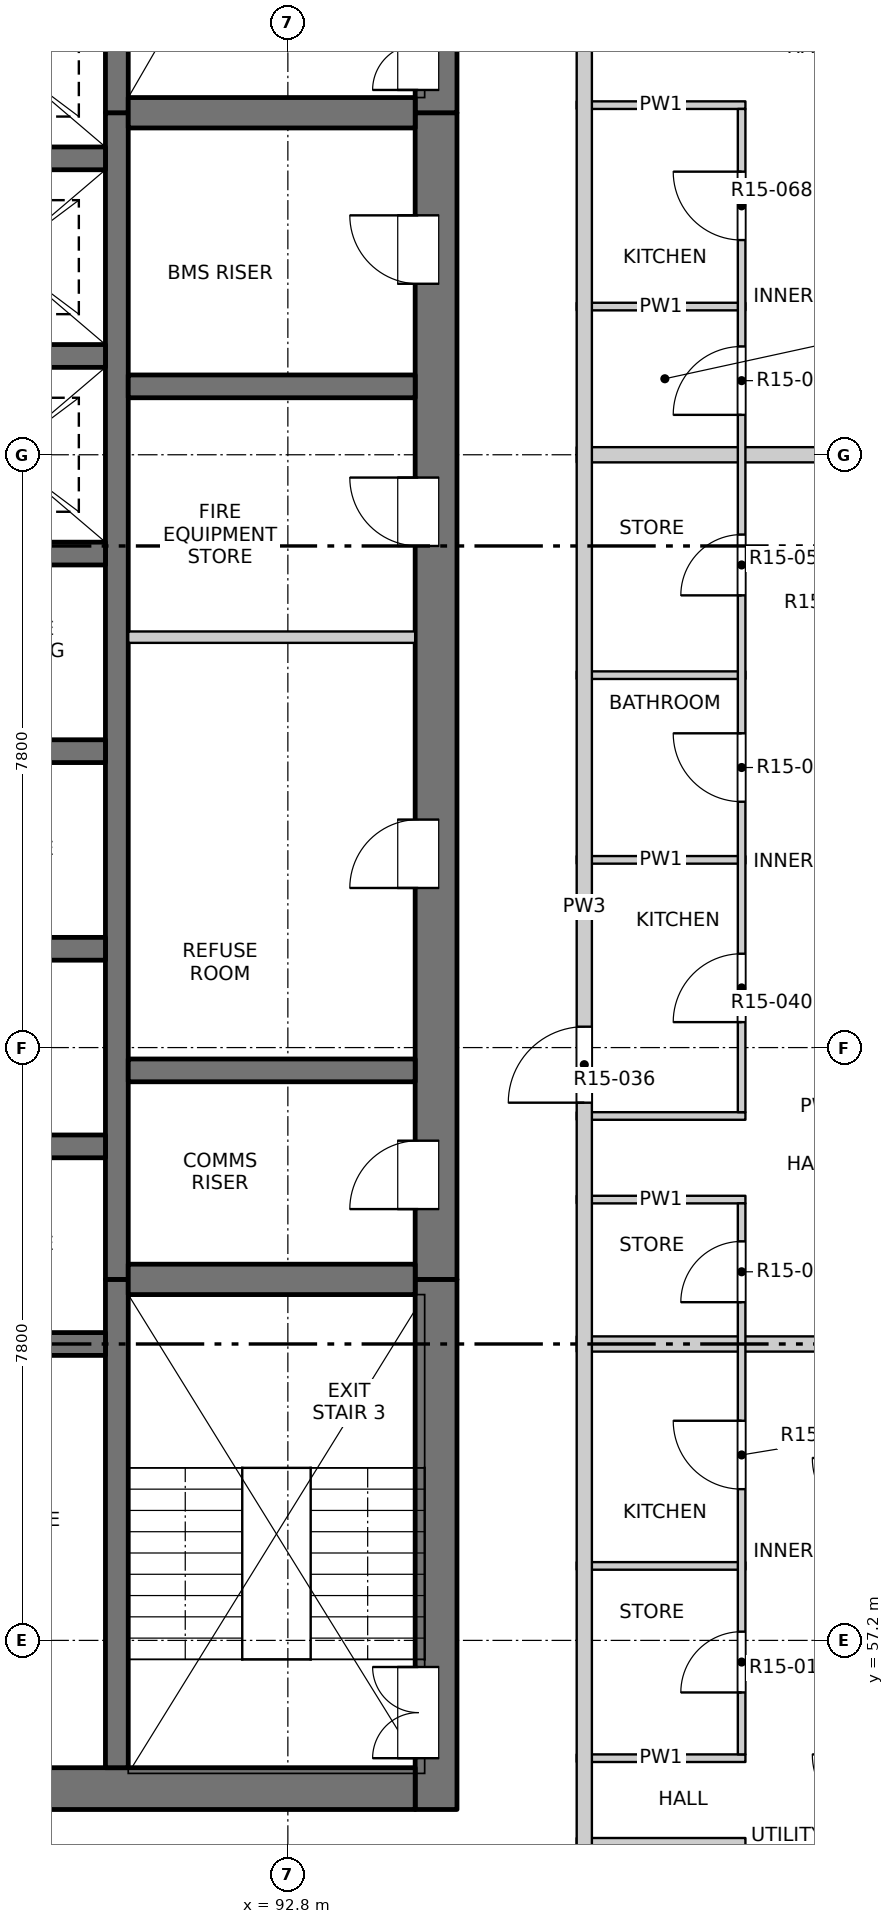
"""IFC4 building model, lengths in metres.
Left out: names, types, materials, properties, quantities, classifications, styles, units other than length and angle.
Written with IfcOpenShell. Run it as: python <this file> out.ifc"""

import sys

from ifc_helpers import new_model, si_unit, direction, frame, frame_2d, origin, place, context, subcontext, project, spatial, rectangle, extrude, element, fill, save


model = new_model("IFC4")
c1 = context("Model", 3, precision=1e-05, world=origin(), true_north=direction((0.0, 1.0)))
c2 = subcontext(c1, "Body", "Model", "MODEL_VIEW")
j1 = project(units=[si_unit("LENGTHUNIT", "METRE"), si_unit("PLANEANGLEUNIT", "RADIAN")], contexts=[c1])
p1 = place(None, origin())
s1 = spatial("IfcSite", under=j1, at=p1, CompositionType="ELEMENT")
p2 = place(p1, origin())
s2 = spatial("IfcBuilding", under=s1, at=p2, CompositionType="ELEMENT")
p3 = place(p2, frame((0.0, 0.0, 158.8)))
s3 = spatial("IfcBuildingStorey", under=s2, at=p3, CompositionType="ELEMENT", Elevation=158.8)
p4 = place(p3, frame((94.75, 54.975, -0.25), z_axis=(0.0, 0.0, 1.0), x_axis=(0.0, 1.0, 0.0)))
e1 = element("IfcWall", 1, at=p4, inside=s3, PredefinedType="SOLIDWALL", context=c2, shape_type="SweptSolid", body=[
    extrude(rectangle(XDim=6.975, YDim=0.55, at=frame_2d((3.487, 0.0))), origin(), (0.0, 0.0, 1.0), 3.4),
])
p5 = place(p4, frame((0.675, 0.0, 0.25)))
e2 = element("IfcOpeningElement", 2, at=p5, cuts=e1, PredefinedType="OPENING", context=c2, shape_type="SweptSolid", body=[
    extrude(rectangle(XDim=1.2, YDim=2.1, at=frame_2d((0.6, 1.05))), frame((0.0, 0.285, 0.0), z_axis=(0.0, -1.0, 0.0), x_axis=(1.0, 0.0, 0.0)), (0.0, 0.0, 1.0), 0.57),
])
p6 = place(p3, frame((94.75, 61.95, -0.25), z_axis=(0.0, 0.0, 1.0), x_axis=(0.0, 1.0, 0.0)))
e3 = element("IfcWall", 3, at=p6, inside=s3, PredefinedType="SOLIDWALL", context=c2, shape_type="SweptSolid", body=[
    extrude(rectangle(XDim=15.35, YDim=0.55, at=frame_2d((7.675, 0.0))), origin(), (0.0, 0.0, 1.0), 3.4),
])
p7 = place(p6, frame((0.925, 0.0, 0.25)))
e4 = element("IfcOpeningElement", 4, at=p7, cuts=e3, PredefinedType="OPENING", context=c2, shape_type="SweptSolid", body=[
    extrude(rectangle(XDim=0.9, YDim=2.1, at=frame_2d((0.45, 1.05))), frame((0.0, 0.285, 0.0), z_axis=(0.0, -1.0, 0.0), x_axis=(1.0, 0.0, 0.0)), (0.0, 0.0, 1.0), 0.57),
])
p8 = place(p6, frame((5.15, 0.0, 0.25)))
e5 = element("IfcOpeningElement", 5, at=p8, cuts=e3, PredefinedType="OPENING", context=c2, shape_type="SweptSolid", body=[
    extrude(rectangle(XDim=0.9, YDim=2.1, at=frame_2d((0.45, 1.05))), frame((0.0, 0.285, 0.0), z_axis=(0.0, -1.0, 0.0), x_axis=(1.0, 0.0, 0.0)), (0.0, 0.0, 1.0), 0.57),
])
p9 = place(p6, frame((9.65, 0.0, 0.25)))
e6 = element("IfcOpeningElement", 6, at=p9, cuts=e3, PredefinedType="OPENING", context=c2, shape_type="SweptSolid", body=[
    extrude(rectangle(XDim=0.9, YDim=2.1, at=frame_2d((0.45, 1.05))), frame((0.0, 0.285, 0.0), z_axis=(0.0, -1.0, 0.0), x_axis=(1.0, 0.0, 0.0)), (0.0, 0.0, 1.0), 0.57),
])
p10 = place(p6, frame((13.1, 0.0, 0.25)))
e7 = element("IfcOpeningElement", 7, at=p10, cuts=e3, PredefinedType="OPENING", context=c2, shape_type="SweptSolid", body=[
    extrude(rectangle(XDim=0.9, YDim=2.1, at=frame_2d((0.45, 1.05))), frame((0.0, 0.285, 0.0), z_axis=(0.0, -1.0, 0.0), x_axis=(1.0, 0.0, 0.0)), (0.0, 0.0, 1.0), 0.57),
])
p11 = place(p3, frame((94.75, 77.3, -0.25), z_axis=(0.0, 0.0, 1.0), x_axis=(0.0, 1.0, 0.0)))
e8 = element("IfcWall", 8, at=p11, inside=s3, PredefinedType="SOLIDWALL", context=c2, shape_type="SweptSolid", body=[
    extrude(rectangle(XDim=7.475, YDim=0.55, at=frame_2d((3.737, 0.0))), origin(), (0.0, 0.0, 1.0), 3.4),
])
p12 = place(p11, frame((0.3, 0.0, 0.25)))
e9 = element("IfcOpeningElement", 9, at=p12, cuts=e8, PredefinedType="OPENING", context=c2, shape_type="SweptSolid", body=[
    extrude(rectangle(XDim=1.2, YDim=2.1, at=frame_2d((0.6, 1.05))), frame((0.0, 0.285, 0.0), z_axis=(0.0, -1.0, 0.0), x_axis=(1.0, 0.0, 0.0)), (0.0, 0.0, 1.0), 0.57),
])
p13 = place(p3, frame((75.525, 55.25, -0.25), z_axis=(0.0, 0.0, 1.0), x_axis=(1.0, 0.0, 0.0)))
e10 = element("IfcWall", 10, at=p13, inside=s3, PredefinedType="SOLIDWALL", context=c2, shape_type="SweptSolid", body=[
    extrude(rectangle(XDim=18.95, YDim=0.55, at=frame_2d((9.475, 0.0))), origin(), (0.0, 0.0, 1.0), 3.4),
])
p14 = place(p13, frame((8.725, 0.0, 0.25)))
e11 = element("IfcOpeningElement", 11, at=p14, cuts=e10, PredefinedType="OPENING", context=c2, shape_type="SweptSolid", body=[
    extrude(rectangle(XDim=1.5, YDim=2.1, at=frame_2d((0.75, 1.05))), frame((0.0, 0.285, 0.0), z_axis=(0.0, -1.0, 0.0), x_axis=(1.0, 0.0, 0.0)), (0.0, 0.0, 1.0), 0.57),
])
p15 = place(p3, frame((90.55, 55.525, -0.25), z_axis=(0.0, 0.0, 1.0), x_axis=(0.0, 1.0, 0.0)))
e12 = element("IfcWall", 12, at=p15, inside=s3, PredefinedType="SOLIDWALL", context=c2, shape_type="SweptSolid", body=[
    extrude(rectangle(XDim=6.425, YDim=0.3, at=frame_2d((3.212, 0.0))), origin(), (0.0, 0.0, 1.0), 3.4),
])
p16 = place(p3, frame((90.55, 61.95, -0.25), z_axis=(0.0, 0.0, 1.0), x_axis=(0.0, 1.0, 0.0)))
e13 = element("IfcWall", 13, at=p16, inside=s3, PredefinedType="SOLIDWALL", context=c2, shape_type="SweptSolid", body=[
    extrude(rectangle(XDim=15.35, YDim=0.3, at=frame_2d((7.675, 0.0))), origin(), (0.0, 0.0, 1.0), 3.4),
])
p17 = place(p3, frame((90.55, 77.3, -0.25), z_axis=(0.0, 0.0, 1.0), x_axis=(0.0, 1.0, 0.0)))
e14 = element("IfcWall", 14, at=p17, inside=s3, PredefinedType="SOLIDWALL", context=c2, shape_type="SweptSolid", body=[
    extrude(rectangle(XDim=6.925, YDim=0.3, at=frame_2d((3.462, 0.0))), origin(), (0.0, 0.0, 1.0), 3.4),
])
for number, where, z_axis, x_axis in (
    (15, (87.4, 61.1, -0.25), (0.0, 0.0, 1.0), (1.0, 0.0, 0.0)),
    (16, (87.4, 63.7, -0.25), (0.0, 0.0, 1.0), (1.0, 0.0, 0.0)),
    (17, (87.4, 66.3, -0.25), (0.0, 0.0, 1.0), (1.0, 0.0, 0.0)),
    (18, (87.4, 68.9, -0.25), (0.0, 0.0, 1.0), (1.0, 0.0, 0.0)),
    (19, (87.4, 71.5, -0.25), (0.0, 0.0, 1.0), (1.0, 0.0, 0.0)),
    (20, (87.4, 74.1, -0.25), (0.0, 0.0, 1.0), (1.0, 0.0, 0.0)),
    (21, (87.4, 76.7, -0.25), (0.0, 0.0, 1.0), (1.0, 0.0, 0.0)),
):
    element("IfcWall", number, at=place(p3, frame(where, z_axis=z_axis, x_axis=x_axis)), inside=s3, PredefinedType="SOLIDWALL", context=c2, shape_type="SweptSolid", body=[
        extrude(rectangle(XDim=3.0, YDim=0.3, at=frame_2d((1.5, 0.0))), origin(), (0.0, 0.0, 1.0), 3.4),
    ])
p18 = place(p3, frame((90.7, 61.95, -0.25), z_axis=(0.0, 0.0, 1.0), x_axis=(1.0, 0.0, 0.0)))
e22 = element("IfcWall", 22, at=p18, inside=s3, PredefinedType="SOLIDWALL", context=c2, shape_type="SweptSolid", body=[
    extrude(rectangle(XDim=3.775, YDim=0.4, at=frame_2d((1.888, 0.0))), origin(), (0.0, 0.0, 1.0), 3.4),
])
for number, where, z_axis, x_axis in (
    (23, (90.7, 64.7, -0.25), (0.0, 0.0, 1.0), (1.0, 0.0, 0.0)),
    (24, (90.7, 73.7, -0.25), (0.0, 0.0, 1.0), (1.0, 0.0, 0.0)),
):
    element("IfcWall", number, at=place(p3, frame(where, z_axis=z_axis, x_axis=x_axis)), inside=s3, PredefinedType="SOLIDWALL", context=c2, shape_type="SweptSolid", body=[
        extrude(rectangle(XDim=3.775, YDim=0.3, at=frame_2d((1.888, 0.0))), origin(), (0.0, 0.0, 1.0), 3.4),
    ])
p19 = place(p3, frame((90.7, 77.3, -0.25), z_axis=(0.0, 0.0, 1.0), x_axis=(1.0, 0.0, 0.0)))
e25 = element("IfcWall", 25, at=p19, inside=s3, PredefinedType="SOLIDWALL", context=c2, shape_type="SweptSolid", body=[
    extrude(rectangle(XDim=3.775, YDim=0.4, at=frame_2d((1.888, 0.0))), origin(), (0.0, 0.0, 1.0), 3.4),
])
for number, where, z_axis, x_axis in (
    (26, (96.6, 54.55, 0.0), (0.0, 0.0, 1.0), (1.0, 0.0, 0.0)),
    (27, (96.6, 55.65, 0.0), (0.0, 0.0, 1.0), (1.0, 0.0, 0.0)),
    (28, (96.6, 58.18, 0.0), (0.0, 0.0, 1.0), (1.0, 0.0, 0.0)),
):
    element("IfcWall", number, at=place(p3, frame(where, z_axis=z_axis, x_axis=x_axis)), inside=s3, PredefinedType="PARTITIONING", context=c2, shape_type="SweptSolid", body=[
        extrude(rectangle(XDim=2.22, YDim=0.1, at=frame_2d((1.11, 0.0))), origin(), (0.0, 0.0, 1.0), 3.15),
    ])
p20 = place(p3, frame((96.6, 61.1, 0.0), z_axis=(0.0, 0.0, 1.0), x_axis=(1.0, 0.0, 0.0)))
e29 = element("IfcWall", 29, at=p20, inside=s3, PredefinedType="PARTITIONING", context=c2, shape_type="SweptSolid", body=[
    extrude(rectangle(XDim=7.6, YDim=0.2, at=frame_2d((3.8, 0.0))), origin(), (0.0, 0.0, 1.0), 2.55),
])
for number, where, z_axis, x_axis in (
    (30, (96.6, 63.0, 0.0), (0.0, 0.0, 1.0), (1.0, 0.0, 0.0)),
    (31, (96.6, 64.1, 0.0), (0.0, 0.0, 1.0), (1.0, 0.0, 0.0)),
    (32, (96.6, 67.47, 0.0), (0.0, 0.0, 1.0), (1.0, 0.0, 0.0)),
    (33, (96.6, 69.9, 0.0), (0.0, 0.0, 1.0), (1.0, 0.0, 0.0)),
):
    element("IfcWall", number, at=place(p3, frame(where, z_axis=z_axis, x_axis=x_axis)), inside=s3, PredefinedType="PARTITIONING", context=c2, shape_type="SweptSolid", body=[
        extrude(rectangle(XDim=2.22, YDim=0.1, at=frame_2d((1.11, 0.0))), origin(), (0.0, 0.0, 1.0), 3.15),
    ])
p21 = place(p3, frame((90.7, 70.4, 0.0), z_axis=(0.0, 0.0, 1.0), x_axis=(1.0, 0.0, 0.0)))
e34 = element("IfcWall", 34, at=p21, inside=s3, PredefinedType="PARTITIONING", context=c2, shape_type="SweptSolid", body=[
    extrude(rectangle(XDim=3.775, YDim=0.15, at=frame_2d((1.887, 0.0))), origin(), (0.0, 0.0, 1.0), 3.15),
])
p22 = place(p3, frame((96.6, 72.8, 0.0), z_axis=(0.0, 0.0, 1.0), x_axis=(1.0, 0.0, 0.0)))
e35 = element("IfcWall", 35, at=p22, inside=s3, PredefinedType="PARTITIONING", context=c2, shape_type="SweptSolid", body=[
    extrude(rectangle(XDim=7.6, YDim=0.2, at=frame_2d((3.8, 0.0))), origin(), (0.0, 0.0, 1.0), 3.15),
])
for number, where, z_axis, x_axis in (
    (36, (96.6, 74.75, 0.0), (0.0, 0.0, 1.0), (1.0, 0.0, 0.0)),
    (37, (96.6, 77.4, 0.0), (0.0, 0.0, 1.0), (1.0, 0.0, 0.0)),
):
    element("IfcWall", number, at=place(p3, frame(where, z_axis=z_axis, x_axis=x_axis)), inside=s3, PredefinedType="PARTITIONING", context=c2, shape_type="SweptSolid", body=[
        extrude(rectangle(XDim=2.22, YDim=0.1, at=frame_2d((1.11, 0.0))), origin(), (0.0, 0.0, 1.0), 3.15),
    ])
p23 = place(p3, frame((96.7, 49.5, 0.0), z_axis=(0.0, 0.0, 1.0), x_axis=(0.0, 1.0, 0.0)))
e38 = element("IfcWall", 38, at=p23, inside=s3, PredefinedType="PARTITIONING", context=c2, shape_type="SweptSolid", body=[
    extrude(rectangle(XDim=34.7, YDim=0.2, at=frame_2d((17.35, 0.0))), origin(), (0.0, 0.0, 1.0), 3.15),
])
p24 = place(p23, frame((3.875, 0.0, 0.0)))
e39 = element("IfcOpeningElement", 39, at=p24, cuts=e38, PredefinedType="OPENING", context=c2, shape_type="SweptSolid", body=[
    extrude(rectangle(XDim=1.0, YDim=2.1, at=frame_2d((0.5, 1.05))), frame((0.0, 0.11, 0.0), z_axis=(0.0, -1.0, 0.0), x_axis=(1.0, 0.0, 0.0)), (0.0, 0.0, 1.0), 0.22),
])
p25 = place(p23, frame((14.775, 0.0, 0.0)))
e40 = element("IfcOpeningElement", 40, at=p25, cuts=e38, PredefinedType="OPENING", context=c2, shape_type="SweptSolid", body=[
    extrude(rectangle(XDim=1.0, YDim=2.1, at=frame_2d((0.5, 1.05))), frame((0.0, 0.11, 0.0), z_axis=(0.0, -1.0, 0.0), x_axis=(1.0, 0.0, 0.0)), (0.0, 0.0, 1.0), 0.22),
])
p26 = place(p23, frame((29.175, 0.0, 0.0)))
e41 = element("IfcOpeningElement", 41, at=p26, cuts=e38, PredefinedType="OPENING", context=c2, shape_type="SweptSolid", body=[
    extrude(rectangle(XDim=1.0, YDim=2.1, at=frame_2d((0.5, 1.05))), frame((0.0, 0.11, 0.0), z_axis=(0.0, -1.0, 0.0), x_axis=(1.0, 0.0, 0.0)), (0.0, 0.0, 1.0), 0.22),
])
p27 = place(p3, frame((98.77, 55.7, 0.0), z_axis=(0.0, 0.0, 1.0), x_axis=(0.0, 1.0, 0.0)))
e42 = element("IfcWall", 42, at=p27, inside=s3, PredefinedType="PARTITIONING", context=c2, shape_type="SweptSolid", body=[
    extrude(rectangle(XDim=7.25, YDim=0.1, at=frame_2d((3.625, 0.0))), origin(), (0.0, 0.0, 1.0), 3.15),
])
p28 = place(p27, frame((0.815, 0.0, 0.0)))
e43 = element("IfcOpeningElement", 43, at=p28, cuts=e42, PredefinedType="OPENING", context=c2, shape_type="SweptSolid", body=[
    extrude(rectangle(XDim=0.8, YDim=2.1, at=frame_2d((0.4, 1.05))), frame((0.0, 0.06, 0.0), z_axis=(0.0, -1.0, 0.0), x_axis=(1.0, 0.0, 0.0)), (0.0, 0.0, 1.0), 0.12),
])
p29 = place(p27, frame((3.49, 0.0, 0.0)))
e44 = element("IfcOpeningElement", 44, at=p29, cuts=e42, PredefinedType="OPENING", context=c2, shape_type="SweptSolid", body=[
    extrude(rectangle(XDim=0.9, YDim=2.1, at=frame_2d((0.45, 1.05))), frame((0.0, 0.06, 0.0), z_axis=(0.0, -1.0, 0.0), x_axis=(1.0, 0.0, 0.0)), (0.0, 0.0, 1.0), 0.12),
])
p30 = place(p27, frame((5.95, 0.0, 0.0)))
e45 = element("IfcOpeningElement", 45, at=p30, cuts=e42, PredefinedType="OPENING", context=c2, shape_type="SweptSolid", body=[
    extrude(rectangle(XDim=0.8, YDim=2.1, at=frame_2d((0.4, 1.05))), frame((0.0, 0.06, 0.0), z_axis=(0.0, -1.0, 0.0), x_axis=(1.0, 0.0, 0.0)), (0.0, 0.0, 1.0), 0.12),
])
p31 = place(p3, frame((98.77, 64.15, 0.0), z_axis=(0.0, 0.0, 1.0), x_axis=(0.0, 1.0, 0.0)))
e46 = element("IfcWall", 46, at=p31, inside=s3, PredefinedType="PARTITIONING", context=c2, shape_type="SweptSolid", body=[
    extrude(rectangle(XDim=13.2, YDim=0.1, at=frame_2d((6.6, 0.0))), origin(), (0.0, 0.0, 1.0), 3.15),
])
p32 = place(p31, frame((1.185, 0.0, 0.0)))
e47 = element("IfcOpeningElement", 47, at=p32, cuts=e46, PredefinedType="OPENING", context=c2, shape_type="SweptSolid", body=[
    extrude(rectangle(XDim=0.9, YDim=2.1, at=frame_2d((0.45, 1.05))), frame((0.0, 0.06, 0.0), z_axis=(0.0, -1.0, 0.0), x_axis=(1.0, 0.0, 0.0)), (0.0, 0.0, 1.0), 0.12),
])
p33 = place(p31, frame((4.085, 0.0, 0.0)))
e48 = element("IfcOpeningElement", 48, at=p33, cuts=e46, PredefinedType="OPENING", context=c2, shape_type="SweptSolid", body=[
    extrude(rectangle(XDim=0.9, YDim=2.1, at=frame_2d((0.45, 1.05))), frame((0.0, 0.06, 0.0), z_axis=(0.0, -1.0, 0.0), x_axis=(1.0, 0.0, 0.0)), (0.0, 0.0, 1.0), 0.12),
])
p34 = place(p31, frame((6.8, 0.0, 0.0)))
e49 = element("IfcOpeningElement", 49, at=p34, cuts=e46, PredefinedType="OPENING", context=c2, shape_type="SweptSolid", body=[
    extrude(rectangle(XDim=0.8, YDim=2.1, at=frame_2d((0.4, 1.05))), frame((0.0, 0.06, 0.0), z_axis=(0.0, -1.0, 0.0), x_axis=(1.0, 0.0, 0.0)), (0.0, 0.0, 1.0), 0.12),
])
p35 = place(p31, frame((9.175, 0.0, 0.0)))
e50 = element("IfcOpeningElement", 50, at=p35, cuts=e46, PredefinedType="OPENING", context=c2, shape_type="SweptSolid", body=[
    extrude(rectangle(XDim=0.9, YDim=2.1, at=frame_2d((0.45, 1.05))), frame((0.0, 0.06, 0.0), z_axis=(0.0, -1.0, 0.0), x_axis=(1.0, 0.0, 0.0)), (0.0, 0.0, 1.0), 0.12),
])
p36 = place(p31, frame((11.475, 0.0, 0.0)))
e51 = element("IfcOpeningElement", 51, at=p36, cuts=e46, PredefinedType="OPENING", context=c2, shape_type="SweptSolid", body=[
    extrude(rectangle(XDim=0.9, YDim=2.1, at=frame_2d((0.45, 1.05))), frame((0.0, 0.06, 0.0), z_axis=(0.0, -1.0, 0.0), x_axis=(1.0, 0.0, 0.0)), (0.0, 0.0, 1.0), 0.12),
])
p37 = place(p5, origin())
e52 = element("IfcDoor", 52, at=p37, inside=s3, OperationType="DOUBLE_DOOR_SINGLE_SWING", PredefinedType="DOOR", context=c2, shape_type="SweptSolid", body=[
    extrude(rectangle(XDim=1.2, YDim=2.1, at=frame_2d((0.6, 1.05))), frame((0.0, 0.26, 0.0), z_axis=(0.0, -1.0, 0.0), x_axis=(1.0, 0.0, 0.0)), (0.0, 0.0, 1.0), 0.05),
])
fill(e2, e52)
p38 = place(p28, origin())
e53 = element("IfcDoor", 53, at=p38, inside=s3, OperationType="SINGLE_SWING_LEFT", PredefinedType="DOOR", context=c2, shape_type="SweptSolid", body=[
    extrude(rectangle(XDim=0.8, YDim=2.1, at=frame_2d((0.4, 1.05))), frame((0.0, 0.025, 0.0), z_axis=(0.0, -1.0, 0.0), x_axis=(1.0, 0.0, 0.0)), (0.0, 0.0, 1.0), 0.05),
])
fill(e43, e53)
p39 = place(p29, origin())
e54 = element("IfcDoor", 54, at=p39, inside=s3, OperationType="SINGLE_SWING_RIGHT", PredefinedType="DOOR", context=c2, shape_type="SweptSolid", body=[
    extrude(rectangle(XDim=0.9, YDim=2.1, at=frame_2d((0.45, 1.05))), frame((0.0, 0.025, 0.0), z_axis=(0.0, -1.0, 0.0), x_axis=(1.0, 0.0, 0.0)), (0.0, 0.0, 1.0), 0.05),
])
fill(e44, e54)
p40 = place(p30, origin())
e55 = element("IfcDoor", 55, at=p40, inside=s3, OperationType="SINGLE_SWING_LEFT", PredefinedType="DOOR", context=c2, shape_type="SweptSolid", body=[
    extrude(rectangle(XDim=0.8, YDim=2.1, at=frame_2d((0.4, 1.05))), frame((0.0, 0.025, 0.0), z_axis=(0.0, -1.0, 0.0), x_axis=(1.0, 0.0, 0.0)), (0.0, 0.0, 1.0), 0.05),
])
fill(e45, e55)
p41 = place(p7, origin())
e56 = element("IfcDoor", 56, at=p41, inside=s3, OperationType="SINGLE_SWING_LEFT", PredefinedType="DOOR", context=c2, shape_type="SweptSolid", body=[
    extrude(rectangle(XDim=0.9, YDim=2.1, at=frame_2d((0.45, 1.05))), frame((0.0, 0.26, 0.0), z_axis=(0.0, -1.0, 0.0), x_axis=(1.0, 0.0, 0.0)), (0.0, 0.0, 1.0), 0.05),
])
fill(e4, e56)
p42 = place(p25, origin())
e57 = element("IfcDoor", 57, at=p42, inside=s3, OperationType="SINGLE_SWING_LEFT", PredefinedType="DOOR", context=c2, shape_type="SweptSolid", body=[
    extrude(rectangle(XDim=1.0, YDim=2.1, at=frame_2d((0.5, 1.05))), frame((0.0, 0.025, 0.0), z_axis=(0.0, -1.0, 0.0), x_axis=(1.0, 0.0, 0.0)), (0.0, 0.0, 1.0), 0.05),
])
fill(e40, e57)
p43 = place(p32, origin())
e58 = element("IfcDoor", 58, at=p43, inside=s3, OperationType="SINGLE_SWING_LEFT", PredefinedType="DOOR", context=c2, shape_type="SweptSolid", body=[
    extrude(rectangle(XDim=0.9, YDim=2.1, at=frame_2d((0.45, 1.05))), frame((0.0, 0.025, 0.0), z_axis=(0.0, -1.0, 0.0), x_axis=(1.0, 0.0, 0.0)), (0.0, 0.0, 1.0), 0.05),
])
fill(e47, e58)
p44 = place(p8, origin())
e59 = element("IfcDoor", 59, at=p44, inside=s3, OperationType="SINGLE_SWING_LEFT", PredefinedType="DOOR", context=c2, shape_type="SweptSolid", body=[
    extrude(rectangle(XDim=0.9, YDim=2.1, at=frame_2d((0.45, 1.05))), frame((0.0, 0.26, 0.0), z_axis=(0.0, -1.0, 0.0), x_axis=(1.0, 0.0, 0.0)), (0.0, 0.0, 1.0), 0.05),
])
fill(e5, e59)
p45 = place(p33, origin())
e60 = element("IfcDoor", 60, at=p45, inside=s3, OperationType="SINGLE_SWING_RIGHT", PredefinedType="DOOR", context=c2, shape_type="SweptSolid", body=[
    extrude(rectangle(XDim=0.9, YDim=2.1, at=frame_2d((0.45, 1.05))), frame((0.0, 0.025, 0.0), z_axis=(0.0, -1.0, 0.0), x_axis=(1.0, 0.0, 0.0)), (0.0, 0.0, 1.0), 0.05),
])
fill(e48, e60)
p46 = place(p34, origin())
e61 = element("IfcDoor", 61, at=p46, inside=s3, OperationType="SINGLE_SWING_LEFT", PredefinedType="DOOR", context=c2, shape_type="SweptSolid", body=[
    extrude(rectangle(XDim=0.8, YDim=2.1, at=frame_2d((0.4, 1.05))), frame((0.0, 0.025, 0.0), z_axis=(0.0, -1.0, 0.0), x_axis=(1.0, 0.0, 0.0)), (0.0, 0.0, 1.0), 0.05),
])
fill(e49, e61)
p47 = place(p9, origin())
e62 = element("IfcDoor", 62, at=p47, inside=s3, OperationType="SINGLE_SWING_RIGHT", PredefinedType="DOOR", context=c2, shape_type="SweptSolid", body=[
    extrude(rectangle(XDim=0.9, YDim=2.1, at=frame_2d((0.45, 1.05))), frame((0.0, 0.26, 0.0), z_axis=(0.0, -1.0, 0.0), x_axis=(1.0, 0.0, 0.0)), (0.0, 0.0, 1.0), 0.05),
])
fill(e6, e62)
p48 = place(p35, origin())
e63 = element("IfcDoor", 63, at=p48, inside=s3, OperationType="SINGLE_SWING_LEFT", PredefinedType="DOOR", context=c2, shape_type="SweptSolid", body=[
    extrude(rectangle(XDim=0.9, YDim=2.1, at=frame_2d((0.45, 1.05))), frame((0.0, 0.025, 0.0), z_axis=(0.0, -1.0, 0.0), x_axis=(1.0, 0.0, 0.0)), (0.0, 0.0, 1.0), 0.05),
])
fill(e50, e63)
p49 = place(p10, origin())
e64 = element("IfcDoor", 64, at=p49, inside=s3, OperationType="SINGLE_SWING_RIGHT", PredefinedType="DOOR", context=c2, shape_type="SweptSolid", body=[
    extrude(rectangle(XDim=0.9, YDim=2.1, at=frame_2d((0.45, 1.05))), frame((0.0, 0.26, 0.0), z_axis=(0.0, -1.0, 0.0), x_axis=(1.0, 0.0, 0.0)), (0.0, 0.0, 1.0), 0.05),
])
fill(e7, e64)
p50 = place(p36, origin())
e65 = element("IfcDoor", 65, at=p50, inside=s3, OperationType="SINGLE_SWING_RIGHT", PredefinedType="DOOR", context=c2, shape_type="SweptSolid", body=[
    extrude(rectangle(XDim=0.9, YDim=2.1, at=frame_2d((0.45, 1.05))), frame((0.0, 0.025, 0.0), z_axis=(0.0, -1.0, 0.0), x_axis=(1.0, 0.0, 0.0)), (0.0, 0.0, 1.0), 0.05),
])
fill(e51, e65)
p51 = place(p12, origin())
e66 = element("IfcDoor", 66, at=p51, inside=s3, OperationType="DOUBLE_DOOR_SINGLE_SWING", PredefinedType="DOOR", context=c2, shape_type="SweptSolid", body=[
    extrude(rectangle(XDim=1.2, YDim=2.1, at=frame_2d((0.6, 1.05))), frame((0.0, 0.26, 0.0), z_axis=(0.0, -1.0, 0.0), x_axis=(1.0, 0.0, 0.0)), (0.0, 0.0, 1.0), 0.05),
])
fill(e9, e66)
save(model, sys.argv[1])
